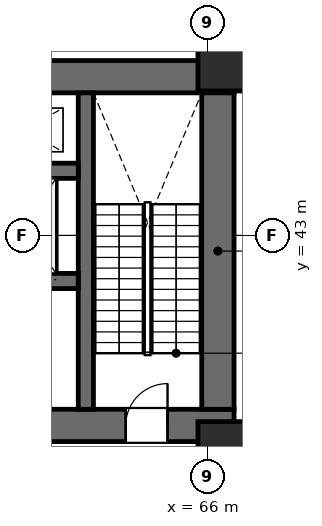
"""IFC4 building model, lengths in metres.
Left out: names, types, materials, properties, quantities, classifications, styles, units other than length and angle.
Written with IfcOpenShell. Run it as: python <this file> out.ifc"""

import sys

from ifc_helpers import new_model, si_unit, direction, frame, frame_2d, origin, origin_2d, place, context, subcontext, project, spatial, rectangle, extrude, element, fill, save


model = new_model("IFC4")
c1 = context("Model", 3, precision=1e-05, world=origin(), true_north=direction((0.0, 1.0)))
c2 = subcontext(c1, "Body", "Model", "MODEL_VIEW")
j1 = project(units=[si_unit("LENGTHUNIT", "METRE"), si_unit("PLANEANGLEUNIT", "RADIAN")], contexts=[c1])
p1 = place(None, origin())
s1 = spatial("IfcSite", under=j1, at=p1, CompositionType="ELEMENT")
p2 = place(p1, origin())
s2 = spatial("IfcBuilding", under=s1, at=p2, CompositionType="ELEMENT")
p3 = place(p2, frame((0.0, 0.0, 24.3)))
s3 = spatial("IfcBuildingStorey", under=s2, at=p3, CompositionType="ELEMENT", Elevation=24.3)
p4 = place(p3, frame((22.9, 47.175, 0.0), z_axis=(0.0, 0.0, 1.0), x_axis=(1.0, 0.0, 0.0)))
e1 = element("IfcWall", 1, at=p4, inside=s3, PredefinedType="SHEAR", context=c2, shape_type="SweptSolid", body=[
    extrude(rectangle(XDim=43.8, YDim=0.85, at=frame_2d((21.9, 0.0))), origin(), (0.0, 0.0, 1.0), 5.2),
])
p5 = place(p3, frame((55.8, 38.0, 0.0), z_axis=(0.0, 0.0, 1.0), x_axis=(1.0, 0.0, 0.0)))
e2 = element("IfcWall", 2, at=p5, inside=s3, PredefinedType="SHEAR", context=c2, shape_type="SweptSolid", body=[
    extrude(rectangle(XDim=10.9, YDim=0.85, at=frame_2d((5.45, 0.0))), origin(), (0.0, 0.0, 1.0), 5.2),
])
p6 = place(p5, frame((1.5, 0.0, 0.0)))
e3 = element("IfcOpeningElement", 3, at=p6, cuts=e2, PredefinedType="OPENING", context=c2, shape_type="SweptSolid", body=[
    extrude(rectangle(XDim=1.1, YDim=2.2, at=frame_2d((0.55, 1.1))), frame((0.0, 0.435, 0.0), z_axis=(0.0, -1.0, 0.0), x_axis=(1.0, 0.0, 0.0)), (0.0, 0.0, 1.0), 0.87),
])
p7 = place(p5, frame((4.82, 0.0, 0.0)))
e4 = element("IfcOpeningElement", 4, at=p7, cuts=e2, PredefinedType="OPENING", context=c2, shape_type="SweptSolid", body=[
    extrude(rectangle(XDim=1.0, YDim=2.15, at=frame_2d((0.5, 1.075))), frame((0.0, 0.435, 0.0), z_axis=(0.0, -1.0, 0.0), x_axis=(1.0, 0.0, 0.0)), (0.0, 0.0, 1.0), 0.87),
])
p8 = place(p5, frame((8.05, 0.0, 0.0)))
e5 = element("IfcOpeningElement", 5, at=p8, cuts=e2, PredefinedType="OPENING", context=c2, shape_type="SweptSolid", body=[
    extrude(rectangle(XDim=1.1, YDim=2.2, at=frame_2d((0.55, 1.1))), frame((0.0, 0.435, 0.0), z_axis=(0.0, -1.0, 0.0), x_axis=(1.0, 0.0, 0.0)), (0.0, 0.0, 1.0), 0.87),
])
p9 = place(p3, frame((66.275, 38.425, 0.0), z_axis=(0.0, 0.0, 1.0), x_axis=(0.0, 1.0, 0.0)))
e6 = element("IfcWall", 6, at=p9, inside=s3, PredefinedType="SHEAR", context=c2, shape_type="SweptSolid", body=[
    extrude(rectangle(XDim=8.325, YDim=0.85, at=frame_2d((4.163, 0.0))), origin(), (0.0, 0.0, 1.0), 5.2),
])
p10 = place(p3, frame((62.8, 38.425, 0.0), z_axis=(0.0, 0.0, 1.0), x_axis=(0.0, 1.0, 0.0)))
e7 = element("IfcWall", 7, at=p10, inside=s3, PredefinedType="SHEAR", context=c2, shape_type="SweptSolid", body=[
    extrude(rectangle(XDim=8.325, YDim=0.4, at=frame_2d((4.163, 0.0))), origin(), (0.0, 0.0, 1.0), 5.2),
])
p11 = place(p3, frame((59.65, 41.8, 0.0), z_axis=(0.0, 0.0, 1.0), x_axis=(1.0, 0.0, 0.0)))
e8 = element("IfcWall", 8, at=p11, inside=s3, PredefinedType="SHEAR", context=c2, shape_type="SweptSolid", body=[
    extrude(rectangle(XDim=2.95, YDim=0.4, at=frame_2d((1.475, 0.0))), origin(), (0.0, 0.0, 1.0), 5.2),
])
p12 = place(p11, frame((0.87, 0.0, 0.0)))
e9 = element("IfcOpeningElement", 9, at=p12, cuts=e8, PredefinedType="OPENING", context=c2, shape_type="SweptSolid", body=[
    extrude(rectangle(XDim=1.2, YDim=2.2, at=frame_2d((0.6, 1.1))), frame((0.0, 0.21, 0.0), z_axis=(0.0, -1.0, 0.0), x_axis=(1.0, 0.0, 0.0)), (0.0, 0.0, 1.0), 0.42),
])
p13 = place(p3, frame((59.65, 44.7, 0.0), z_axis=(0.0, 0.0, 1.0), x_axis=(1.0, 0.0, 0.0)))
e10 = element("IfcWall", 10, at=p13, inside=s3, PredefinedType="SHEAR", context=c2, shape_type="SweptSolid", body=[
    extrude(rectangle(XDim=2.95, YDim=0.4, at=frame_2d((1.475, 0.0))), origin(), (0.0, 0.0, 1.0), 5.2),
])
for number, where, z_axis, x_axis in (
    (11, (66.5, 47.55, 0.0), (0.0, 0.0, 1.0), (1.0, 0.0, 0.0)),
    (12, (66.5, 37.35, 0.0), (0.0, 0.0, 1.0), (1.0, 0.0, 0.0)),
):
    element("IfcColumn", number, at=place(p3, frame(where, z_axis=z_axis, x_axis=x_axis)), inside=s3, PredefinedType="COLUMN", context=c2, shape_type="SweptSolid", body=[
        extrude(rectangle(XDim=1.5, YDim=1.5, at=origin_2d()), origin(), (0.0, 0.0, 1.0), 5.2),
    ])
p14 = place(p3, frame((66.5, 34.468, 0.0), z_axis=(0.0, 0.0, 1.0), x_axis=(0.0, 1.0, 0.0)))
e13 = element("IfcWall", 13, at=p14, inside=s3, PredefinedType="STANDARD", context=c2, shape_type="SweptSolid", body=[
    extrude(rectangle(XDim=3.099, YDim=0.18, at=frame_2d((1.549, 0.0))), origin(), (0.0, 0.0, 1.0), 3.992),
])
p15 = place(p8, origin())
e14 = element("IfcDoor", 14, at=p15, inside=s3, OperationType="SINGLE_SWING_RIGHT", PredefinedType="DOOR", context=c2, shape_type="SweptSolid", body=[
    extrude(rectangle(XDim=1.1, YDim=2.2, at=frame_2d((0.55, 1.1))), frame((0.0, 0.025, 0.0), z_axis=(0.0, -1.0, 0.0), x_axis=(1.0, 0.0, 0.0)), (0.0, 0.0, 1.0), 0.05),
])
fill(e5, e14)
save(model, sys.argv[1])
